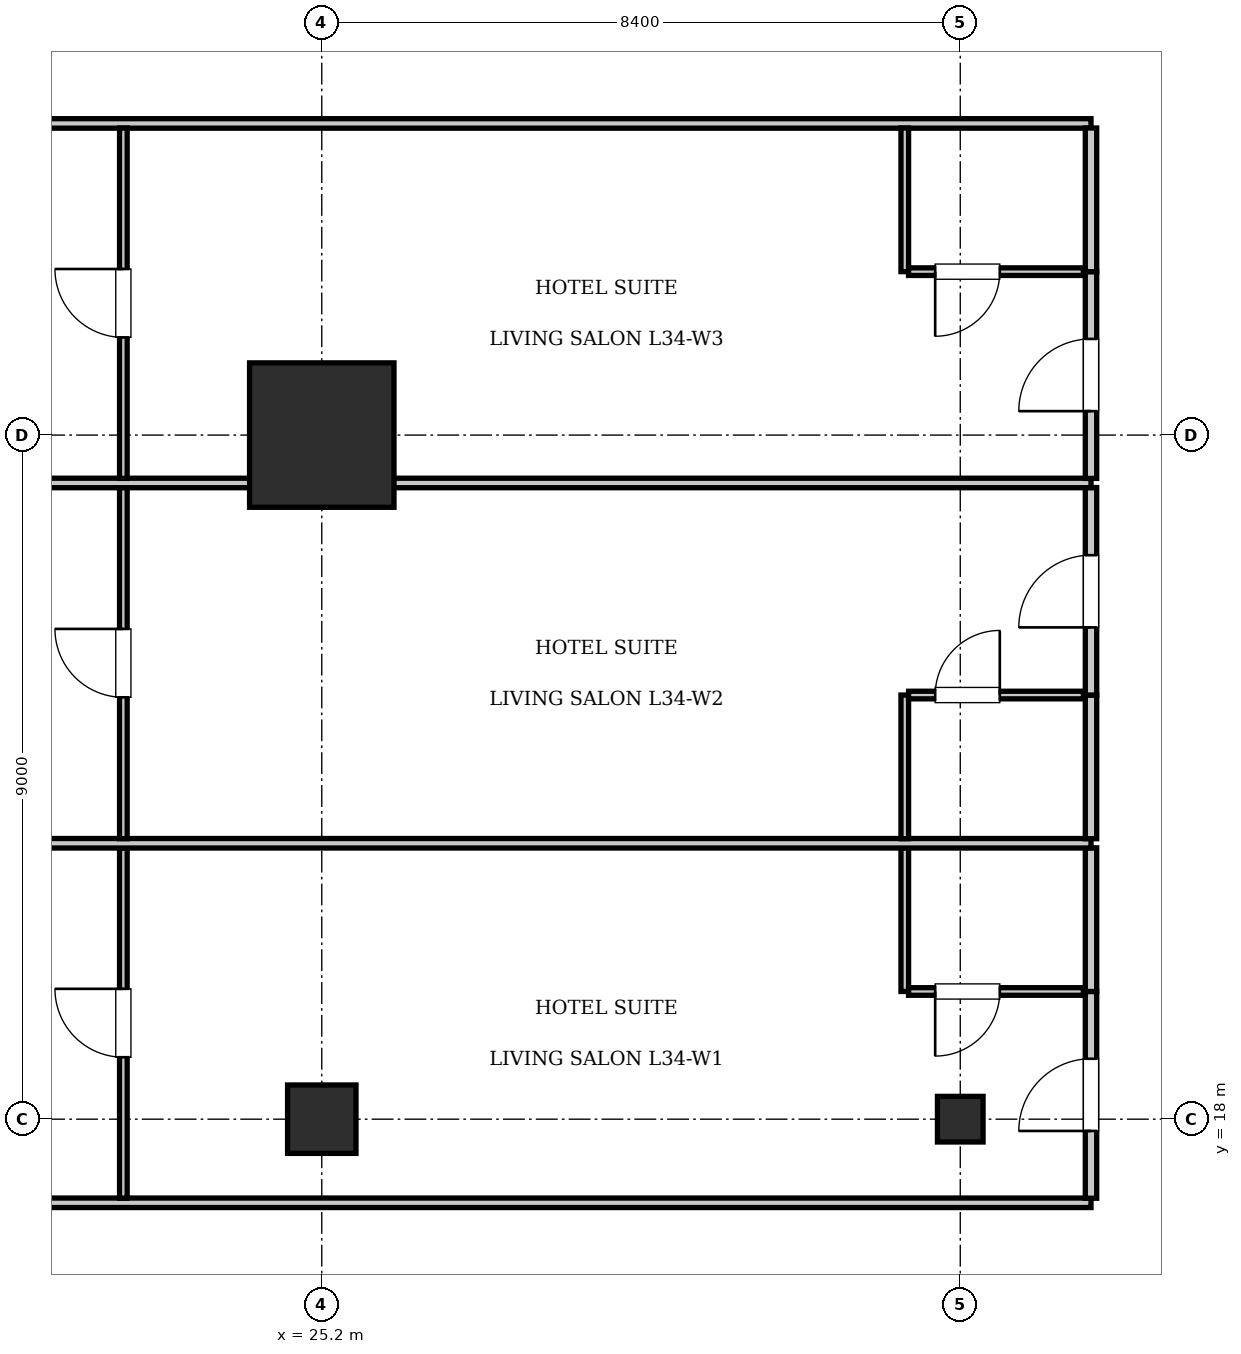
"""IFC4 building model, lengths in metres.
Left out: names, types, materials, properties, quantities, classifications, styles, units other than length and angle.
Written with IfcOpenShell. Run it as: python <this file> out.ifc"""

import sys

from ifc_helpers import new_model, si_unit, direction, frame, frame_2d, origin, origin_2d, place, context, subcontext, project, spatial, rectangle, i_section, extrude, element, fill, save


model = new_model("IFC4")
c1 = context("Model", 3, precision=1e-05, world=origin(), true_north=direction((0.0, 1.0)))
c2 = subcontext(c1, "Body", "Model", "MODEL_VIEW")
j1 = project(units=[si_unit("LENGTHUNIT", "METRE"), si_unit("PLANEANGLEUNIT", "RADIAN")], contexts=[c1])
p1 = place(None, origin())
s1 = spatial("IfcSite", under=j1, at=p1, CompositionType="ELEMENT")
p2 = place(p1, origin())
s2 = spatial("IfcBuilding", under=s1, at=p2, CompositionType="ELEMENT")
p3 = place(p2, frame((0.0, 0.0, 142.8)))
s3 = spatial("IfcBuildingStorey", under=s2, at=p3, CompositionType="ELEMENT", Elevation=142.8)
p4 = place(p3, frame((25.2, 27.0, 0.0), z_axis=(0.0, 0.0, 1.0), x_axis=(1.0, 0.0, 0.0)))
e1 = element("IfcColumn", 1, at=p4, inside=s3, PredefinedType="COLUMN", context=c2, shape_type="SweptSolid", body=[
    extrude(rectangle(XDim=1.9, YDim=1.9, at=origin_2d()), origin(), (0.0, 0.0, 1.0), 3.85),
])
p5 = place(p3, frame((25.2, 18.0, 0.0), z_axis=(0.0, 0.0, 1.0), x_axis=(1.0, 0.0, 0.0)))
e2 = element("IfcColumn", 2, at=p5, inside=s3, PredefinedType="COLUMN", context=c2, shape_type="SweptSolid", body=[
    extrude(rectangle(XDim=0.9, YDim=0.9, at=origin_2d()), origin(), (0.0, 0.0, 1.0), 3.85),
])
p6 = place(p3, frame((33.6, 18.0, 0.0), z_axis=(0.0, 0.0, 1.0), x_axis=(1.0, 0.0, 0.0)))
e3 = element("IfcColumn", 3, at=p6, inside=s3, PredefinedType="COLUMN", context=c2, shape_type="SweptSolid", body=[
    extrude(i_section(OverallWidth=0.6, OverallDepth=0.6, WebThickness=0.025, FlangeThickness=0.038, at=origin_2d()), origin(), (0.0, 0.0, 1.0), 3.85),
])
for number, where, z_axis, x_axis in (
    (4, (13.2, 16.9, 0.0), (0.0, 0.0, 1.0), (1.0, 0.0, 0.0)),
    (5, (13.2, 31.1, 0.0), (0.0, 0.0, 1.0), (1.0, 0.0, 0.0)),
):
    element("IfcWall", number, at=place(p3, frame(where, z_axis=z_axis, x_axis=x_axis)), inside=s3, PredefinedType="PARTITIONING", context=c2, shape_type="SweptSolid", body=[
        extrude(rectangle(XDim=22.12, YDim=0.125, at=frame_2d((11.06, 0.0))), origin(), (0.0, 0.0, 1.0), 3.61),
    ])
p7 = place(p3, frame((35.32, 16.96, 0.0), z_axis=(0.0, 0.0, 1.0), x_axis=(0.0, 1.0, 0.0)))
e6 = element("IfcWall", 6, at=p7, inside=s3, PredefinedType="PARTITIONING", context=c2, shape_type="SweptSolid", body=[
    extrude(rectangle(XDim=2.72, YDim=0.15, at=frame_2d((1.36, 0.0))), origin(), (0.0, 0.0, 1.0), 3.61),
])
p8 = place(p7, frame((0.885, 0.0, 0.0)))
e7 = element("IfcOpeningElement", 7, at=p8, cuts=e6, PredefinedType="OPENING", context=c2, shape_type="SweptSolid", body=[
    extrude(rectangle(XDim=0.95, YDim=2.15, at=frame_2d((0.475, 1.075))), frame((0.0, 0.085, 0.0), z_axis=(0.0, -1.0, 0.0), x_axis=(1.0, 0.0, 0.0)), (0.0, 0.0, 1.0), 0.17),
])
p9 = place(p3, frame((35.32, 19.68, 0.0), z_axis=(0.0, 0.0, 1.0), x_axis=(0.0, 1.0, 0.0)))
e8 = element("IfcWall", 8, at=p9, inside=s3, PredefinedType="PARTITIONING", context=c2, shape_type="SweptSolid", body=[
    extrude(rectangle(XDim=1.89, YDim=0.15, at=frame_2d((0.945, 0.0))), origin(), (0.0, 0.0, 1.0), 3.61),
])
p10 = place(p3, frame((32.87, 19.68, 0.0), z_axis=(0.0, 0.0, 1.0), x_axis=(0.0, 1.0, 0.0)))
e9 = element("IfcWall", 9, at=p10, inside=s3, PredefinedType="PARTITIONING", context=c2, shape_type="SweptSolid", body=[
    extrude(rectangle(XDim=1.89, YDim=0.1, at=frame_2d((0.945, 0.0))), origin(), (0.0, 0.0, 1.0), 3.61),
])
p11 = place(p3, frame((32.92, 19.68, 0.0), z_axis=(0.0, 0.0, 1.0), x_axis=(1.0, 0.0, 0.0)))
e10 = element("IfcWall", 10, at=p11, inside=s3, PredefinedType="PARTITIONING", context=c2, shape_type="SweptSolid", body=[
    extrude(rectangle(XDim=2.3, YDim=0.1, at=frame_2d((1.15, 0.0))), origin(), (0.0, 0.0, 1.0), 3.61),
])
p12 = place(p11, frame((0.35, 0.0, 0.0)))
e11 = element("IfcOpeningElement", 11, at=p12, cuts=e10, PredefinedType="OPENING", context=c2, shape_type="SweptSolid", body=[
    extrude(rectangle(XDim=0.85, YDim=2.1, at=frame_2d((0.425, 1.05))), frame((0.0, 0.06, 0.0), z_axis=(0.0, -1.0, 0.0), x_axis=(1.0, 0.0, 0.0)), (0.0, 0.0, 1.0), 0.12),
])
p13 = place(p3, frame((22.59, 16.96, 0.0), z_axis=(0.0, 0.0, 1.0), x_axis=(0.0, 1.0, 0.0)))
e12 = element("IfcWall", 12, at=p13, inside=s3, PredefinedType="PARTITIONING", context=c2, shape_type="SweptSolid", body=[
    extrude(rectangle(XDim=4.61, YDim=0.1, at=frame_2d((2.305, 0.0))), origin(), (0.0, 0.0, 1.0), 3.61),
])
p14 = place(p13, frame((1.855, 0.0, 0.0)))
e13 = element("IfcOpeningElement", 13, at=p14, cuts=e12, PredefinedType="OPENING", context=c2, shape_type="SweptSolid", body=[
    extrude(rectangle(XDim=0.9, YDim=2.1, at=frame_2d((0.45, 1.05))), frame((0.0, 0.06, 0.0), z_axis=(0.0, -1.0, 0.0), x_axis=(1.0, 0.0, 0.0)), (0.0, 0.0, 1.0), 0.12),
])
p15 = place(p3, frame((13.2, 21.63, 0.0), z_axis=(0.0, 0.0, 1.0), x_axis=(1.0, 0.0, 0.0)))
e14 = element("IfcWall", 14, at=p15, inside=s3, PredefinedType="PARTITIONING", context=c2, shape_type="SweptSolid", body=[
    extrude(rectangle(XDim=22.12, YDim=0.125, at=frame_2d((11.06, 0.0))), origin(), (0.0, 0.0, 1.0), 3.61),
])
p16 = place(p3, frame((35.32, 21.69, 0.0), z_axis=(0.0, 0.0, 1.0), x_axis=(0.0, 1.0, 0.0)))
e15 = element("IfcWall", 15, at=p16, inside=s3, PredefinedType="PARTITIONING", context=c2, shape_type="SweptSolid", body=[
    extrude(rectangle(XDim=1.89, YDim=0.15, at=frame_2d((0.945, 0.0))), origin(), (0.0, 0.0, 1.0), 3.61),
])
p17 = place(p3, frame((35.32, 23.58, 0.0), z_axis=(0.0, 0.0, 1.0), x_axis=(0.0, 1.0, 0.0)))
e16 = element("IfcWall", 16, at=p17, inside=s3, PredefinedType="PARTITIONING", context=c2, shape_type="SweptSolid", body=[
    extrude(rectangle(XDim=2.73, YDim=0.15, at=frame_2d((1.365, 0.0))), origin(), (0.0, 0.0, 1.0), 3.61),
])
p18 = place(p17, frame((0.89, 0.0, 0.0)))
e17 = element("IfcOpeningElement", 17, at=p18, cuts=e16, PredefinedType="OPENING", context=c2, shape_type="SweptSolid", body=[
    extrude(rectangle(XDim=0.95, YDim=2.15, at=frame_2d((0.475, 1.075))), frame((0.0, 0.085, 0.0), z_axis=(0.0, -1.0, 0.0), x_axis=(1.0, 0.0, 0.0)), (0.0, 0.0, 1.0), 0.17),
])
p19 = place(p3, frame((32.87, 21.69, 0.0), z_axis=(0.0, 0.0, 1.0), x_axis=(0.0, 1.0, 0.0)))
e18 = element("IfcWall", 18, at=p19, inside=s3, PredefinedType="PARTITIONING", context=c2, shape_type="SweptSolid", body=[
    extrude(rectangle(XDim=1.89, YDim=0.1, at=frame_2d((0.945, 0.0))), origin(), (0.0, 0.0, 1.0), 3.61),
])
p20 = place(p3, frame((32.92, 23.58, 0.0), z_axis=(0.0, 0.0, 1.0), x_axis=(1.0, 0.0, 0.0)))
e19 = element("IfcWall", 19, at=p20, inside=s3, PredefinedType="PARTITIONING", context=c2, shape_type="SweptSolid", body=[
    extrude(rectangle(XDim=2.3, YDim=0.1, at=frame_2d((1.15, 0.0))), origin(), (0.0, 0.0, 1.0), 3.61),
])
p21 = place(p20, frame((0.35, 0.0, 0.0)))
e20 = element("IfcOpeningElement", 20, at=p21, cuts=e19, PredefinedType="OPENING", context=c2, shape_type="SweptSolid", body=[
    extrude(rectangle(XDim=0.85, YDim=2.1, at=frame_2d((0.425, 1.05))), frame((0.0, 0.06, 0.0), z_axis=(0.0, -1.0, 0.0), x_axis=(1.0, 0.0, 0.0)), (0.0, 0.0, 1.0), 0.12),
])
p22 = place(p3, frame((22.59, 21.69, 0.0), z_axis=(0.0, 0.0, 1.0), x_axis=(0.0, 1.0, 0.0)))
e21 = element("IfcWall", 21, at=p22, inside=s3, PredefinedType="PARTITIONING", context=c2, shape_type="SweptSolid", body=[
    extrude(rectangle(XDim=4.62, YDim=0.1, at=frame_2d((2.31, 0.0))), origin(), (0.0, 0.0, 1.0), 3.61),
])
p23 = place(p22, frame((1.86, 0.0, 0.0)))
e22 = element("IfcOpeningElement", 22, at=p23, cuts=e21, PredefinedType="OPENING", context=c2, shape_type="SweptSolid", body=[
    extrude(rectangle(XDim=0.9, YDim=2.1, at=frame_2d((0.45, 1.05))), frame((0.0, 0.06, 0.0), z_axis=(0.0, -1.0, 0.0), x_axis=(1.0, 0.0, 0.0)), (0.0, 0.0, 1.0), 0.12),
])
p24 = place(p3, frame((13.2, 26.37, 0.0), z_axis=(0.0, 0.0, 1.0), x_axis=(1.0, 0.0, 0.0)))
e23 = element("IfcWall", 23, at=p24, inside=s3, PredefinedType="PARTITIONING", context=c2, shape_type="SweptSolid", body=[
    extrude(rectangle(XDim=22.12, YDim=0.125, at=frame_2d((11.06, 0.0))), origin(), (0.0, 0.0, 1.0), 3.61),
])
p25 = place(p3, frame((35.32, 26.43, 0.0), z_axis=(0.0, 0.0, 1.0), x_axis=(0.0, 1.0, 0.0)))
e24 = element("IfcWall", 24, at=p25, inside=s3, PredefinedType="PARTITIONING", context=c2, shape_type="SweptSolid", body=[
    extrude(rectangle(XDim=2.72, YDim=0.15, at=frame_2d((1.36, 0.0))), origin(), (0.0, 0.0, 1.0), 3.61),
])
p26 = place(p25, frame((0.885, 0.0, 0.0)))
e25 = element("IfcOpeningElement", 25, at=p26, cuts=e24, PredefinedType="OPENING", context=c2, shape_type="SweptSolid", body=[
    extrude(rectangle(XDim=0.95, YDim=2.15, at=frame_2d((0.475, 1.075))), frame((0.0, 0.085, 0.0), z_axis=(0.0, -1.0, 0.0), x_axis=(1.0, 0.0, 0.0)), (0.0, 0.0, 1.0), 0.17),
])
p27 = place(p3, frame((35.32, 29.15, 0.0), z_axis=(0.0, 0.0, 1.0), x_axis=(0.0, 1.0, 0.0)))
e26 = element("IfcWall", 26, at=p27, inside=s3, PredefinedType="PARTITIONING", context=c2, shape_type="SweptSolid", body=[
    extrude(rectangle(XDim=1.89, YDim=0.15, at=frame_2d((0.945, 0.0))), origin(), (0.0, 0.0, 1.0), 3.61),
])
p28 = place(p3, frame((32.87, 29.15, 0.0), z_axis=(0.0, 0.0, 1.0), x_axis=(0.0, 1.0, 0.0)))
e27 = element("IfcWall", 27, at=p28, inside=s3, PredefinedType="PARTITIONING", context=c2, shape_type="SweptSolid", body=[
    extrude(rectangle(XDim=1.89, YDim=0.1, at=frame_2d((0.945, 0.0))), origin(), (0.0, 0.0, 1.0), 3.61),
])
p29 = place(p3, frame((32.92, 29.15, 0.0), z_axis=(0.0, 0.0, 1.0), x_axis=(1.0, 0.0, 0.0)))
e28 = element("IfcWall", 28, at=p29, inside=s3, PredefinedType="PARTITIONING", context=c2, shape_type="SweptSolid", body=[
    extrude(rectangle(XDim=2.3, YDim=0.1, at=frame_2d((1.15, 0.0))), origin(), (0.0, 0.0, 1.0), 3.61),
])
p30 = place(p29, frame((0.35, 0.0, 0.0)))
e29 = element("IfcOpeningElement", 29, at=p30, cuts=e28, PredefinedType="OPENING", context=c2, shape_type="SweptSolid", body=[
    extrude(rectangle(XDim=0.85, YDim=2.1, at=frame_2d((0.425, 1.05))), frame((0.0, 0.06, 0.0), z_axis=(0.0, -1.0, 0.0), x_axis=(1.0, 0.0, 0.0)), (0.0, 0.0, 1.0), 0.12),
])
p31 = place(p3, frame((22.59, 26.43, 0.0), z_axis=(0.0, 0.0, 1.0), x_axis=(0.0, 1.0, 0.0)))
e30 = element("IfcWall", 30, at=p31, inside=s3, PredefinedType="PARTITIONING", context=c2, shape_type="SweptSolid", body=[
    extrude(rectangle(XDim=4.61, YDim=0.1, at=frame_2d((2.305, 0.0))), origin(), (0.0, 0.0, 1.0), 3.61),
])
p32 = place(p31, frame((1.855, 0.0, 0.0)))
e31 = element("IfcOpeningElement", 31, at=p32, cuts=e30, PredefinedType="OPENING", context=c2, shape_type="SweptSolid", body=[
    extrude(rectangle(XDim=0.9, YDim=2.1, at=frame_2d((0.45, 1.05))), frame((0.0, 0.06, 0.0), z_axis=(0.0, -1.0, 0.0), x_axis=(1.0, 0.0, 0.0)), (0.0, 0.0, 1.0), 0.12),
])
p33 = place(p12, frame((0.85, 0.0, 0.0), z_axis=(0.0, 0.0, 1.0), x_axis=(-1.0, 0.0, 0.0)))
e32 = element("IfcDoor", 32, at=p33, inside=s3, OperationType="SINGLE_SWING_RIGHT", PredefinedType="DOOR", context=c2, shape_type="SweptSolid", body=[
    extrude(rectangle(XDim=0.85, YDim=2.1, at=frame_2d((0.425, 1.05))), frame((0.0, 0.025, 0.0), z_axis=(0.0, -1.0, 0.0), x_axis=(1.0, 0.0, 0.0)), (0.0, 0.0, 1.0), 0.05),
])
fill(e11, e32)
p34 = place(p8, origin())
e33 = element("IfcDoor", 33, at=p34, inside=s3, OperationType="SINGLE_SWING_LEFT", PredefinedType="DOOR", context=c2, shape_type="SweptSolid", body=[
    extrude(rectangle(XDim=0.95, YDim=2.15, at=frame_2d((0.475, 1.075))), frame((0.0, 0.025, 0.0), z_axis=(0.0, -1.0, 0.0), x_axis=(1.0, 0.0, 0.0)), (0.0, 0.0, 1.0), 0.05),
])
fill(e7, e33)
p35 = place(p14, origin())
e34 = element("IfcDoor", 34, at=p35, inside=s3, OperationType="SINGLE_SWING_RIGHT", PredefinedType="DOOR", context=c2, shape_type="SweptSolid", body=[
    extrude(rectangle(XDim=0.9, YDim=2.1, at=frame_2d((0.45, 1.05))), frame((0.0, 0.025, 0.0), z_axis=(0.0, -1.0, 0.0), x_axis=(1.0, 0.0, 0.0)), (0.0, 0.0, 1.0), 0.05),
])
fill(e13, e34)
p36 = place(p21, origin())
e35 = element("IfcDoor", 35, at=p36, inside=s3, OperationType="SINGLE_SWING_RIGHT", PredefinedType="DOOR", context=c2, shape_type="SweptSolid", body=[
    extrude(rectangle(XDim=0.85, YDim=2.1, at=frame_2d((0.425, 1.05))), frame((0.0, 0.025, 0.0), z_axis=(0.0, -1.0, 0.0), x_axis=(1.0, 0.0, 0.0)), (0.0, 0.0, 1.0), 0.05),
])
fill(e20, e35)
p37 = place(p18, origin())
e36 = element("IfcDoor", 36, at=p37, inside=s3, OperationType="SINGLE_SWING_LEFT", PredefinedType="DOOR", context=c2, shape_type="SweptSolid", body=[
    extrude(rectangle(XDim=0.95, YDim=2.15, at=frame_2d((0.475, 1.075))), frame((0.0, 0.025, 0.0), z_axis=(0.0, -1.0, 0.0), x_axis=(1.0, 0.0, 0.0)), (0.0, 0.0, 1.0), 0.05),
])
fill(e17, e36)
p38 = place(p23, origin())
e37 = element("IfcDoor", 37, at=p38, inside=s3, OperationType="SINGLE_SWING_RIGHT", PredefinedType="DOOR", context=c2, shape_type="SweptSolid", body=[
    extrude(rectangle(XDim=0.9, YDim=2.1, at=frame_2d((0.45, 1.05))), frame((0.0, 0.025, 0.0), z_axis=(0.0, -1.0, 0.0), x_axis=(1.0, 0.0, 0.0)), (0.0, 0.0, 1.0), 0.05),
])
fill(e22, e37)
p39 = place(p30, frame((0.85, 0.0, 0.0), z_axis=(0.0, 0.0, 1.0), x_axis=(-1.0, 0.0, 0.0)))
e38 = element("IfcDoor", 38, at=p39, inside=s3, OperationType="SINGLE_SWING_RIGHT", PredefinedType="DOOR", context=c2, shape_type="SweptSolid", body=[
    extrude(rectangle(XDim=0.85, YDim=2.1, at=frame_2d((0.425, 1.05))), frame((0.0, 0.025, 0.0), z_axis=(0.0, -1.0, 0.0), x_axis=(1.0, 0.0, 0.0)), (0.0, 0.0, 1.0), 0.05),
])
fill(e29, e38)
p40 = place(p26, origin())
e39 = element("IfcDoor", 39, at=p40, inside=s3, OperationType="SINGLE_SWING_LEFT", PredefinedType="DOOR", context=c2, shape_type="SweptSolid", body=[
    extrude(rectangle(XDim=0.95, YDim=2.15, at=frame_2d((0.475, 1.075))), frame((0.0, 0.025, 0.0), z_axis=(0.0, -1.0, 0.0), x_axis=(1.0, 0.0, 0.0)), (0.0, 0.0, 1.0), 0.05),
])
fill(e25, e39)
p41 = place(p32, origin())
e40 = element("IfcDoor", 40, at=p41, inside=s3, OperationType="SINGLE_SWING_RIGHT", PredefinedType="DOOR", context=c2, shape_type="SweptSolid", body=[
    extrude(rectangle(XDim=0.9, YDim=2.1, at=frame_2d((0.45, 1.05))), frame((0.0, 0.025, 0.0), z_axis=(0.0, -1.0, 0.0), x_axis=(1.0, 0.0, 0.0)), (0.0, 0.0, 1.0), 0.05),
])
fill(e31, e40)
save(model, sys.argv[1])
